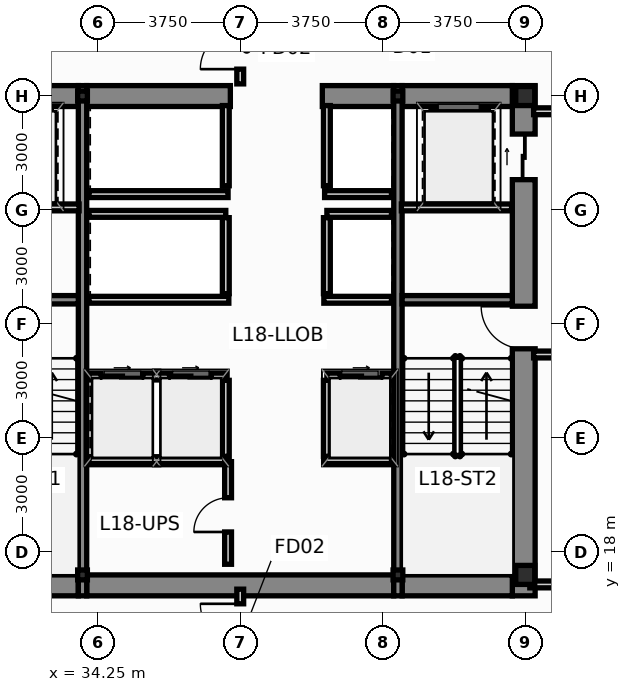
"""IFC4 building model, lengths in metres.
Left out: names, types, materials, properties, quantities, classifications, styles, units other than length and angle.
Written with IfcOpenShell. Run it as: python <this file> out.ifc"""

import sys

from ifc_helpers import new_model, si_unit, direction, frame, frame_2d, origin, origin_2d, place, context, subcontext, project, spatial, rectangle, i_section, extrude, source, transform, mapped, element, fill, save


model = new_model("IFC4")
c1 = context("Model", 3, precision=1e-05, world=origin(), true_north=direction((0.0, 1.0)))
c2 = subcontext(c1, "Body", "Model", "MODEL_VIEW")
j1 = project(units=[si_unit("LENGTHUNIT", "METRE"), si_unit("PLANEANGLEUNIT", "RADIAN")], contexts=[c1])
p1 = place(None, origin())
s1 = spatial("IfcSite", under=j1, at=p1, CompositionType="ELEMENT")
p2 = place(p1, origin())
s2 = spatial("IfcBuilding", under=s1, at=p2, CompositionType="ELEMENT")
p3 = place(p2, frame((0.0, 0.0, 71.4)))
s3 = spatial("IfcBuildingStorey", under=s2, at=p3, CompositionType="ELEMENT", Elevation=71.4)
m1 = source(origin(), c2, "Body", "SweptSolid", [
    extrude(i_section(OverallWidth=0.5, OverallDepth=0.5, WebThickness=0.028, FlangeThickness=0.04, at=origin_2d()), origin(), (0.0, 0.0, 1.0), 3.65),
])
for number, where, z_axis, x_axis in (
    (1, (45.5, 17.4, 0.0), (0.0, 0.0, 1.0), (1.0, 0.0, 0.0)),
    (2, (45.5, 30.0, 0.0), (0.0, 0.0, 1.0), (1.0, 0.0, 0.0)),
):
    element("IfcColumn", number, at=place(p3, frame(where, z_axis=z_axis, x_axis=x_axis)), inside=s3, PredefinedType="COLUMN", context=c2, shape_type="MappedRepresentation", body=[
        mapped(m1, transform((0.0, 0.0, 0.0), scale=1.0)),
    ])
m2 = source(origin(), c2, "Body", "SweptSolid", [
    extrude(i_section(OverallWidth=0.256, OverallDepth=0.26, WebThickness=0.01, FlangeThickness=0.017, at=origin_2d()), origin(), (0.0, 0.0, 1.0), 3.65),
])
for number, where, z_axis, x_axis in (
    (3, (33.85, 17.4, 0.0), (0.0, 0.0, 1.0), (1.0, 0.0, 0.0)),
    (4, (42.15, 17.4, 0.0), (0.0, 0.0, 1.0), (1.0, 0.0, 0.0)),
    (5, (33.85, 30.0, 0.0), (0.0, 0.0, 1.0), (1.0, 0.0, 0.0)),
    (6, (42.15, 30.0, 0.0), (0.0, 0.0, 1.0), (1.0, 0.0, 0.0)),
):
    element("IfcColumn", number, at=place(p3, frame(where, z_axis=z_axis, x_axis=x_axis)), inside=s3, PredefinedType="COLUMN", context=c2, shape_type="MappedRepresentation", body=[
        mapped(m2, transform((0.0, 0.0, 0.0), scale=1.0)),
    ])
p4 = place(p3, frame((45.46, 16.85, 0.0), z_axis=(0.0, 0.0, 1.0), x_axis=(0.0, 1.0, 0.0)))
e7 = element("IfcWall", 7, at=p4, inside=s3, PredefinedType="SHEAR", context=c2, shape_type="SweptSolid", body=[
    extrude(rectangle(XDim=13.425, YDim=0.6, at=frame_2d((6.712, 0.0))), origin(), (0.0, 0.0, 1.0), 3.65),
])
p5 = place(p4, frame((6.5, 0.0, 0.0)))
e8 = element("IfcOpeningElement", 8, at=p5, cuts=e7, PredefinedType="OPENING", context=c2, shape_type="SweptSolid", body=[
    extrude(rectangle(XDim=1.12, YDim=2.15, at=frame_2d((0.56, 1.075))), frame((0.0, 0.312, 0.0), z_axis=(0.0, -1.0, 0.0), x_axis=(1.0, 0.0, 0.0)), (0.0, 0.0, 1.0), 0.624),
])
p6 = place(p4, frame((10.95, 0.0, 0.0)))
e9 = element("IfcOpeningElement", 9, at=p6, cuts=e7, PredefinedType="OPENING", context=c2, shape_type="SweptSolid", body=[
    extrude(rectangle(XDim=1.2, YDim=2.2, at=frame_2d((0.6, 1.1))), frame((0.0, 0.312, 0.0), z_axis=(0.0, -1.0, 0.0), x_axis=(1.0, 0.0, 0.0)), (0.0, 0.0, 1.0), 0.624),
])
p7 = place(p3, frame((30.84, 17.125, 0.0), z_axis=(0.0, 0.0, 1.0), x_axis=(1.0, 0.0, 0.0)))
e10 = element("IfcWall", 10, at=p7, inside=s3, PredefinedType="SHEAR", context=c2, shape_type="SweptSolid", body=[
    extrude(rectangle(XDim=2.9, YDim=0.55, at=frame_2d((1.45, 0.0))), origin(), (0.0, 0.0, 1.0), 3.65),
])
p8 = place(p3, frame((33.96, 17.125, 0.0), z_axis=(0.0, 0.0, 1.0), x_axis=(1.0, 0.0, 0.0)))
e11 = element("IfcWall", 11, at=p8, inside=s3, PredefinedType="SHEAR", context=c2, shape_type="SweptSolid", body=[
    extrude(rectangle(XDim=8.08, YDim=0.55, at=frame_2d((4.04, 0.0))), origin(), (0.0, 0.0, 1.0), 3.65),
])
for number, where, z_axis, x_axis in (
    (12, (42.26, 17.125, 0.0), (0.0, 0.0, 1.0), (1.0, 0.0, 0.0)),
    (13, (30.84, 30.0, 0.0), (0.0, 0.0, 1.0), (1.0, 0.0, 0.0)),
):
    element("IfcWall", number, at=place(p3, frame(where, z_axis=z_axis, x_axis=x_axis)), inside=s3, PredefinedType="SHEAR", context=c2, shape_type="SweptSolid", body=[
        extrude(rectangle(XDim=2.9, YDim=0.55, at=frame_2d((1.45, 0.0))), origin(), (0.0, 0.0, 1.0), 3.65),
    ])
p9 = place(p3, frame((33.96, 30.0, 0.0), z_axis=(0.0, 0.0, 1.0), x_axis=(1.0, 0.0, 0.0)))
e14 = element("IfcWall", 14, at=p9, inside=s3, PredefinedType="SHEAR", context=c2, shape_type="SweptSolid", body=[
    extrude(rectangle(XDim=3.78, YDim=0.55, at=frame_2d((1.89, 0.0))), origin(), (0.0, 0.0, 1.0), 3.65),
])
p10 = place(p3, frame((40.16, 30.0, 0.0), z_axis=(0.0, 0.0, 1.0), x_axis=(1.0, 0.0, 0.0)))
e15 = element("IfcWall", 15, at=p10, inside=s3, PredefinedType="SHEAR", context=c2, shape_type="SweptSolid", body=[
    extrude(rectangle(XDim=1.88, YDim=0.55, at=frame_2d((0.94, 0.0))), origin(), (0.0, 0.0, 1.0), 3.65),
])
p11 = place(p3, frame((42.26, 30.0, 0.0), z_axis=(0.0, 0.0, 1.0), x_axis=(1.0, 0.0, 0.0)))
e16 = element("IfcWall", 16, at=p11, inside=s3, PredefinedType="SHEAR", context=c2, shape_type="SweptSolid", body=[
    extrude(rectangle(XDim=2.9, YDim=0.55, at=frame_2d((1.45, 0.0))), origin(), (0.0, 0.0, 1.0), 3.65),
])
for number, where, z_axis, x_axis in (
    (17, (33.85, 16.85, 0.0), (0.0, 0.0, 1.0), (0.0, 1.0, 0.0)),
    (18, (42.15, 16.85, 0.0), (0.0, 0.0, 1.0), (0.0, 1.0, 0.0)),
):
    element("IfcWall", number, at=place(p3, frame(where, z_axis=z_axis, x_axis=x_axis)), inside=s3, PredefinedType="SHEAR", context=c2, shape_type="SweptSolid", body=[
        extrude(rectangle(XDim=13.425, YDim=0.22, at=frame_2d((6.712, 0.0))), origin(), (0.0, 0.0, 1.0), 3.65),
    ])
for number, where, z_axis, x_axis in (
    (19, (30.84, 24.64, 0.0), (0.0, 0.0, 1.0), (1.0, 0.0, 0.0)),
    (20, (42.26, 24.64, 0.0), (0.0, 0.0, 1.0), (1.0, 0.0, 0.0)),
):
    element("IfcWall", number, at=place(p3, frame(where, z_axis=z_axis, x_axis=x_axis)), inside=s3, PredefinedType="SHEAR", context=c2, shape_type="SweptSolid", body=[
        extrude(rectangle(XDim=2.9, YDim=0.22, at=frame_2d((1.45, 0.0))), origin(), (0.0, 0.0, 1.0), 3.65),
    ])
p12 = place(p3, frame((34.02, 22.62, 0.0), z_axis=(0.0, 0.0, 1.0), x_axis=(1.0, 0.0, 0.0)))
e21 = element("IfcWall", 21, at=p12, inside=s3, PredefinedType="PARTITIONING", context=c2, shape_type="SweptSolid", body=[
    extrude(rectangle(XDim=3.6, YDim=0.18, at=frame_2d((1.8, 0.0))), origin(), (0.0, 0.0, 1.0), 3.25),
])
p13 = place(p12, frame((0.32, 0.0, 0.0)))
e22 = element("IfcOpeningElement", 22, at=p13, cuts=e21, PredefinedType="OPENING", context=c2, shape_type="SweptSolid", body=[
    extrude(rectangle(XDim=1.1, YDim=2.2, at=frame_2d((0.55, 1.1))), frame((0.0, 0.102, 0.0), z_axis=(0.0, -1.0, 0.0), x_axis=(1.0, 0.0, 0.0)), (0.0, 0.0, 1.0), 0.204),
])
p14 = place(p12, frame((2.12, 0.0, 0.0)))
e23 = element("IfcOpeningElement", 23, at=p14, cuts=e21, PredefinedType="OPENING", context=c2, shape_type="SweptSolid", body=[
    extrude(rectangle(XDim=1.1, YDim=2.2, at=frame_2d((0.55, 1.1))), frame((0.0, 0.102, 0.0), z_axis=(0.0, -1.0, 0.0), x_axis=(1.0, 0.0, 0.0)), (0.0, 0.0, 1.0), 0.204),
])
p15 = place(p3, frame((40.28, 22.62, 0.0), z_axis=(0.0, 0.0, 1.0), x_axis=(1.0, 0.0, 0.0)))
e24 = element("IfcWall", 24, at=p15, inside=s3, PredefinedType="PARTITIONING", context=c2, shape_type="SweptSolid", body=[
    extrude(rectangle(XDim=1.7, YDim=0.18, at=frame_2d((0.85, 0.0))), origin(), (0.0, 0.0, 1.0), 3.25),
])
p16 = place(p15, frame((0.35, 0.0, 0.0)))
e25 = element("IfcOpeningElement", 25, at=p16, cuts=e24, PredefinedType="OPENING", context=c2, shape_type="SweptSolid", body=[
    extrude(rectangle(XDim=1.1, YDim=2.2, at=frame_2d((0.55, 1.1))), frame((0.0, 0.102, 0.0), z_axis=(0.0, -1.0, 0.0), x_axis=(1.0, 0.0, 0.0)), (0.0, 0.0, 1.0), 0.204),
])
for number, where, z_axis, x_axis in (
    (26, (37.62, 20.52, 0.0), (0.0, 0.0, 1.0), (0.0, 1.0, 0.0)),
    (27, (40.28, 20.52, 0.0), (0.0, 0.0, 1.0), (0.0, 1.0, 0.0)),
):
    element("IfcWall", number, at=place(p3, frame(where, z_axis=z_axis, x_axis=x_axis)), inside=s3, PredefinedType="PARTITIONING", context=c2, shape_type="SweptSolid", body=[
        extrude(rectangle(XDim=2.0, YDim=0.18, at=frame_2d((1.0, 0.0))), origin(), (0.0, 0.0, 1.0), 3.25),
    ])
p17 = place(p3, frame((34.02, 26.9, 0.0), z_axis=(0.0, 0.0, 1.0), x_axis=(1.0, 0.0, 0.0)))
e28 = element("IfcWall", 28, at=p17, inside=s3, PredefinedType="PARTITIONING", context=c2, shape_type="SweptSolid", body=[
    extrude(rectangle(XDim=3.6, YDim=0.18, at=frame_2d((1.8, 0.0))), origin(), (0.0, 0.0, 1.0), 3.25),
])
p18 = place(p3, frame((40.28, 26.9, 0.0), z_axis=(0.0, 0.0, 1.0), x_axis=(1.0, 0.0, 0.0)))
e29 = element("IfcWall", 29, at=p18, inside=s3, PredefinedType="PARTITIONING", context=c2, shape_type="SweptSolid", body=[
    extrude(rectangle(XDim=1.7, YDim=0.18, at=frame_2d((0.85, 0.0))), origin(), (0.0, 0.0, 1.0), 3.25),
])
for number, where, z_axis, x_axis in (
    (30, (37.62, 24.8, 0.0), (0.0, 0.0, 1.0), (0.0, 1.0, 0.0)),
    (31, (40.28, 24.8, 0.0), (0.0, 0.0, 1.0), (0.0, 1.0, 0.0)),
):
    element("IfcWall", number, at=place(p3, frame(where, z_axis=z_axis, x_axis=x_axis)), inside=s3, PredefinedType="PARTITIONING", context=c2, shape_type="SweptSolid", body=[
        extrude(rectangle(XDim=2.0, YDim=0.18, at=frame_2d((1.0, 0.0))), origin(), (0.0, 0.0, 1.0), 3.25),
    ])
p19 = place(p3, frame((34.02, 24.64, 0.0), z_axis=(0.0, 0.0, 1.0), x_axis=(1.0, 0.0, 0.0)))
e32 = element("IfcWall", 32, at=p19, inside=s3, PredefinedType="PARTITIONING", context=c2, shape_type="SweptSolid", body=[
    extrude(rectangle(XDim=3.68, YDim=0.18, at=frame_2d((1.84, 0.0))), origin(), (0.0, 0.0, 1.0), 3.25),
])
p20 = place(p3, frame((40.2, 24.64, 0.0), z_axis=(0.0, 0.0, 1.0), x_axis=(1.0, 0.0, 0.0)))
e33 = element("IfcWall", 33, at=p20, inside=s3, PredefinedType="PARTITIONING", context=c2, shape_type="SweptSolid", body=[
    extrude(rectangle(XDim=1.78, YDim=0.18, at=frame_2d((0.89, 0.0))), origin(), (0.0, 0.0, 1.0), 3.25),
])
p21 = place(p3, frame((34.02, 27.42, 0.0), z_axis=(0.0, 0.0, 1.0), x_axis=(1.0, 0.0, 0.0)))
e34 = element("IfcWall", 34, at=p21, inside=s3, PredefinedType="PARTITIONING", context=c2, shape_type="SweptSolid", body=[
    extrude(rectangle(XDim=3.66, YDim=0.18, at=frame_2d((1.83, 0.0))), origin(), (0.0, 0.0, 1.0), 3.25),
])
p22 = place(p3, frame((40.22, 27.42, 0.0), z_axis=(0.0, 0.0, 1.0), x_axis=(1.0, 0.0, 0.0)))
e35 = element("IfcWall", 35, at=p22, inside=s3, PredefinedType="PARTITIONING", context=c2, shape_type="SweptSolid", body=[
    extrude(rectangle(XDim=1.76, YDim=0.18, at=frame_2d((0.88, 0.0))), origin(), (0.0, 0.0, 1.0), 3.25),
])
for number, where, z_axis, x_axis in (
    (36, (37.62, 27.64, 0.0), (0.0, 0.0, 1.0), (0.0, 1.0, 0.0)),
    (37, (40.28, 27.64, 0.0), (0.0, 0.0, 1.0), (0.0, 1.0, 0.0)),
):
    element("IfcWall", number, at=place(p3, frame(where, z_axis=z_axis, x_axis=x_axis)), inside=s3, PredefinedType="PARTITIONING", context=c2, shape_type="SweptSolid", body=[
        extrude(rectangle(XDim=2.11, YDim=0.18, at=frame_2d((1.055, 0.0))), origin(), (0.0, 0.0, 1.0), 3.25),
    ])
p23 = place(p3, frame((45.72, 23.2, 0.0), z_axis=(0.0, 0.0, 1.0), x_axis=(1.0, 0.0, 0.0)))
e38 = element("IfcWall", 38, at=p23, inside=s3, PredefinedType="PARTITIONING", context=c2, shape_type="SweptSolid", body=[
    extrude(rectangle(XDim=2.76, YDim=0.18, at=frame_2d((1.38, 0.0))), origin(), (0.0, 0.0, 1.0), 3.25),
])
p24 = place(p3, frame((45.72, 29.6, 0.0), z_axis=(0.0, 0.0, 1.0), x_axis=(1.0, 0.0, 0.0)))
e39 = element("IfcWall", 39, at=p24, inside=s3, PredefinedType="PARTITIONING", context=c2, shape_type="SweptSolid", body=[
    extrude(rectangle(XDim=2.76, YDim=0.18, at=frame_2d((1.38, 0.0))), origin(), (0.0, 0.0, 1.0), 2.633),
])
for number, where, z_axis, x_axis in (
    (40, (30.86, 27.07, 0.0), (0.0, 0.0, 1.0), (1.0, 0.0, 0.0)),
    (41, (42.24, 27.07, 0.0), (0.0, 0.0, 1.0), (1.0, 0.0, 0.0)),
):
    element("IfcWall", number, at=place(p3, frame(where, z_axis=z_axis, x_axis=x_axis)), inside=s3, PredefinedType="PARTITIONING", context=c2, shape_type="SweptSolid", body=[
        extrude(rectangle(XDim=2.9, YDim=0.18, at=frame_2d((1.45, 0.0))), origin(), (0.0, 0.0, 1.0), 3.25),
    ])
p25 = place(p3, frame((34.02, 20.42, 0.0), z_axis=(0.0, 0.0, 1.0), x_axis=(1.0, 0.0, 0.0)))
e42 = element("IfcWall", 42, at=p25, inside=s3, PredefinedType="PARTITIONING", context=c2, shape_type="SweptSolid", body=[
    extrude(rectangle(XDim=3.64, YDim=0.18, at=frame_2d((1.82, 0.0))), origin(), (0.0, 0.0, 1.0), 3.25),
])
p26 = place(p3, frame((40.22, 20.42, 0.0), z_axis=(0.0, 0.0, 1.0), x_axis=(1.0, 0.0, 0.0)))
e43 = element("IfcWall", 43, at=p26, inside=s3, PredefinedType="PARTITIONING", context=c2, shape_type="SweptSolid", body=[
    extrude(rectangle(XDim=1.76, YDim=0.18, at=frame_2d((0.88, 0.0))), origin(), (0.0, 0.0, 1.0), 3.25),
])
p27 = place(p3, frame((37.68, 17.68, 0.0), z_axis=(0.0, 0.0, 1.0), x_axis=(0.0, 1.0, 0.0)))
e44 = element("IfcWall", 44, at=p27, inside=s3, PredefinedType="PARTITIONING", context=c2, shape_type="SweptSolid", body=[
    extrude(rectangle(XDim=2.7, YDim=0.18, at=frame_2d((1.35, 0.0))), origin(), (0.0, 0.0, 1.0), 3.25),
])
p28 = place(p27, frame((0.85, 0.0, 0.0)))
e45 = element("IfcOpeningElement", 45, at=p28, cuts=e44, PredefinedType="OPENING", context=c2, shape_type="SweptSolid", body=[
    extrude(rectangle(XDim=0.9, YDim=2.1, at=frame_2d((0.45, 1.05))), frame((0.0, 0.102, 0.0), z_axis=(0.0, -1.0, 0.0), x_axis=(1.0, 0.0, 0.0)), (0.0, 0.0, 1.0), 0.204),
])
p29 = place(p3, frame((45.62, 17.15, 0.0), z_axis=(0.0, 0.0, 1.0), x_axis=(1.0, 0.0, 0.0)))
e46 = element("IfcWall", 46, at=p29, inside=s3, PredefinedType="PARTITIONING", context=c2, shape_type="SweptSolid", body=[
    extrude(rectangle(XDim=2.9, YDim=0.18, at=frame_2d((1.45, 0.0))), origin(), (0.0, 0.0, 1.0), 2.633),
])
p30 = place(p3, frame((38.0, 15.205, 0.0), z_axis=(0.0, 0.0, 1.0), x_axis=(0.0, 1.0, 0.0)))
e47 = element("IfcWall", 47, at=p30, inside=s3, PredefinedType="PARTITIONING", context=c2, shape_type="SweptSolid", body=[
    extrude(rectangle(XDim=1.82, YDim=0.18, at=frame_2d((0.91, 0.0))), origin(), (0.0, 0.0, 1.0), 3.25),
])
p31 = place(p30, frame((0.385, 0.0, 0.0)))
e48 = element("IfcOpeningElement", 48, at=p31, cuts=e47, PredefinedType="OPENING", context=c2, shape_type="SweptSolid", body=[
    extrude(rectangle(XDim=1.05, YDim=2.15, at=frame_2d((0.525, 1.075))), frame((0.0, 0.102, 0.0), z_axis=(0.0, -1.0, 0.0), x_axis=(1.0, 0.0, 0.0)), (0.0, 0.0, 1.0), 0.204),
])
p32 = place(p3, frame((38.0, 30.32, 0.0), z_axis=(0.0, 0.0, 1.0), x_axis=(0.0, 1.0, 0.0)))
e49 = element("IfcWall", 49, at=p32, inside=s3, PredefinedType="PARTITIONING", context=c2, shape_type="SweptSolid", body=[
    extrude(rectangle(XDim=1.825, YDim=0.18, at=frame_2d((0.913, 0.0))), origin(), (0.0, 0.0, 1.0), 3.25),
])
p33 = place(p32, frame((0.388, 0.0, 0.0)))
e50 = element("IfcOpeningElement", 50, at=p33, cuts=e49, PredefinedType="OPENING", context=c2, shape_type="SweptSolid", body=[
    extrude(rectangle(XDim=1.05, YDim=2.15, at=frame_2d((0.525, 1.075))), frame((0.0, 0.102, 0.0), z_axis=(0.0, -1.0, 0.0), x_axis=(1.0, 0.0, 0.0)), (0.0, 0.0, 1.0), 0.204),
])
p34 = place(p5, origin())
e51 = element("IfcDoor", 51, at=p34, inside=s3, OperationType="SINGLE_SWING_RIGHT", PredefinedType="DOOR", context=c2, shape_type="SweptSolid", body=[
    extrude(rectangle(XDim=1.12, YDim=2.15, at=frame_2d((0.56, 1.075))), frame((0.0, 0.025, 0.0), z_axis=(0.0, -1.0, 0.0), x_axis=(1.0, 0.0, 0.0)), (0.0, 0.0, 1.0), 0.05),
])
fill(e8, e51)
p35 = place(p6, origin())
e52 = element("IfcDoor", 52, at=p35, inside=s3, OperationType="SLIDING_TO_RIGHT", PredefinedType="DOOR", context=c2, shape_type="SweptSolid", body=[
    extrude(rectangle(XDim=1.2, YDim=2.2, at=frame_2d((0.6, 1.1))), frame((0.0, 0.025, 0.0), z_axis=(0.0, -1.0, 0.0), x_axis=(1.0, 0.0, 0.0)), (0.0, 0.0, 1.0), 0.05),
])
fill(e9, e52)
p36 = place(p13, origin())
e53 = element("IfcDoor", 53, at=p36, inside=s3, OperationType="SLIDING_TO_LEFT", PredefinedType="DOOR", context=c2, shape_type="SweptSolid", body=[
    extrude(rectangle(XDim=1.1, YDim=2.2, at=frame_2d((0.55, 1.1))), frame((0.0, 0.025, 0.0), z_axis=(0.0, -1.0, 0.0), x_axis=(1.0, 0.0, 0.0)), (0.0, 0.0, 1.0), 0.05),
])
fill(e22, e53)
p37 = place(p14, origin())
e54 = element("IfcDoor", 54, at=p37, inside=s3, OperationType="SLIDING_TO_RIGHT", PredefinedType="DOOR", context=c2, shape_type="SweptSolid", body=[
    extrude(rectangle(XDim=1.1, YDim=2.2, at=frame_2d((0.55, 1.1))), frame((0.0, 0.025, 0.0), z_axis=(0.0, -1.0, 0.0), x_axis=(1.0, 0.0, 0.0)), (0.0, 0.0, 1.0), 0.05),
])
fill(e23, e54)
p38 = place(p16, origin())
e55 = element("IfcDoor", 55, at=p38, inside=s3, OperationType="SLIDING_TO_LEFT", PredefinedType="DOOR", context=c2, shape_type="SweptSolid", body=[
    extrude(rectangle(XDim=1.1, YDim=2.2, at=frame_2d((0.55, 1.1))), frame((0.0, 0.025, 0.0), z_axis=(0.0, -1.0, 0.0), x_axis=(1.0, 0.0, 0.0)), (0.0, 0.0, 1.0), 0.05),
])
fill(e25, e55)
p39 = place(p28, origin())
e56 = element("IfcDoor", 56, at=p39, inside=s3, OperationType="SINGLE_SWING_LEFT", PredefinedType="DOOR", context=c2, shape_type="SweptSolid", body=[
    extrude(rectangle(XDim=0.9, YDim=2.1, at=frame_2d((0.45, 1.05))), frame((0.0, 0.025, 0.0), z_axis=(0.0, -1.0, 0.0), x_axis=(1.0, 0.0, 0.0)), (0.0, 0.0, 1.0), 0.05),
])
fill(e45, e56)
p40 = place(p31, origin())
e57 = element("IfcDoor", 57, at=p40, inside=s3, OperationType="SINGLE_SWING_RIGHT", PredefinedType="DOOR", context=c2, shape_type="SweptSolid", body=[
    extrude(rectangle(XDim=1.05, YDim=2.15, at=frame_2d((0.525, 1.075))), frame((0.0, 0.025, 0.0), z_axis=(0.0, -1.0, 0.0), x_axis=(1.0, 0.0, 0.0)), (0.0, 0.0, 1.0), 0.05),
])
fill(e48, e57)
p41 = place(p33, origin())
e58 = element("IfcDoor", 58, at=p41, inside=s3, OperationType="SINGLE_SWING_LEFT", PredefinedType="DOOR", context=c2, shape_type="SweptSolid", body=[
    extrude(rectangle(XDim=1.05, YDim=2.15, at=frame_2d((0.525, 1.075))), frame((0.0, 0.025, 0.0), z_axis=(0.0, -1.0, 0.0), x_axis=(1.0, 0.0, 0.0)), (0.0, 0.0, 1.0), 0.05),
])
fill(e50, e58)
save(model, sys.argv[1])
